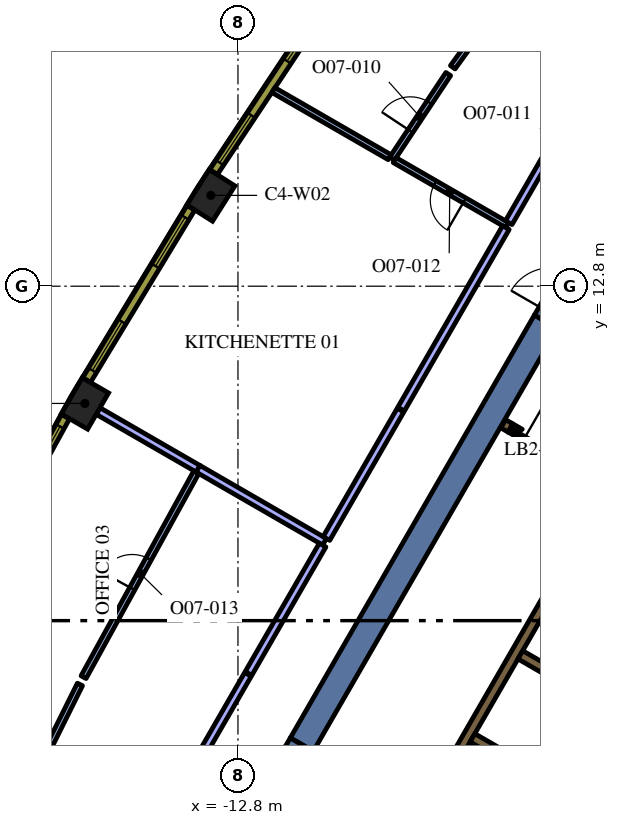
"""IFC4 building model, lengths in metres.
Left out: names, types, materials, properties, quantities, classifications, styles, units other than length and angle.
Written with IfcOpenShell. Run it as: python <this file> out.ifc"""

import sys

from ifc_helpers import new_model, si_unit, direction, frame, frame_2d, origin, origin_2d, place, context, subcontext, project, spatial, polyline, rectangle, outline, extrude, element, fill, save


model = new_model("IFC4")
c1 = context("Model", 3, precision=1e-05, world=origin(), true_north=direction((0.0, 1.0)))
c2 = subcontext(c1, "Body", "Model", "MODEL_VIEW")
j1 = project(units=[si_unit("LENGTHUNIT", "METRE"), si_unit("PLANEANGLEUNIT", "RADIAN")], contexts=[c1])
p1 = place(None, origin())
s1 = spatial("IfcSite", under=j1, at=p1, CompositionType="ELEMENT")
p2 = place(p1, origin())
s2 = spatial("IfcBuilding", under=s1, at=p2, CompositionType="ELEMENT")
p3 = place(p2, frame((0.0, 0.0, 214.2)))
s3 = spatial("IfcBuildingStorey", under=s2, at=p3, CompositionType="ELEMENT", Elevation=214.2)
for number, where, z_axis, x_axis in (
    (1, (-13.513, 15.19, 0.0), (0.0, 0.0, 1.0), (-0.536, -0.845, 0.0)),
    (2, (-16.827, 9.715, 0.0), (0.0, 0.0, 1.0), (-0.5, -0.866, 0.0)),
):
    element("IfcColumn", number, at=place(p3, frame(where, z_axis=z_axis, x_axis=x_axis)), inside=s3, PredefinedType="COLUMN", context=c2, shape_type="SweptSolid", body=[
        extrude(rectangle(XDim=1.1, YDim=0.8, at=origin_2d()), origin(), (0.0, 0.0, 1.0), 4.2),
    ])
p4 = place(p3, frame((-4.696, 11.867, 0.0), z_axis=(0.0, 0.0, 1.0), x_axis=(-0.500003726532, -0.866023252259, 0.0)))
e3 = element("IfcWall", 3, at=p4, inside=s3, PredefinedType="SOLIDWALL", context=c2, shape_type="SweptSolid", body=[
    extrude(rectangle(XDim=12.848, YDim=0.7, at=frame_2d((6.424, 0.0))), origin(), (0.0, 0.0, 1.0), 4.2),
])
p5 = place(p3, origin())
e4 = element("IfcWall", 4, at=p5, inside=s3, PredefinedType="SOLIDWALL", context=c2, shape_type="SweptSolid", body=[
    extrude(outline(polyline([(-11.543, 0.708), (-11.424, 0.914), (-10.843, 0.578), (-10.962, 0.372), (-11.543, 0.708)])), origin(), (0.0, 0.0, 1.0), 4.2),
])
p6 = place(p3, frame((-8.06, -1.311, 0.0), z_axis=(0.0, 0.0, 1.0), x_axis=(0.50000273126, 0.866023826885, 0.0)))
e5 = element("IfcWall", 5, at=p6, inside=s3, PredefinedType="SOLIDWALL", context=c2, shape_type="SweptSolid", body=[
    extrude(rectangle(XDim=10.33, YDim=0.25, at=frame_2d((5.165, 0.0))), origin(), (0.0, 0.0, 1.0), 4.2),
])
for number, where, z_axis, x_axis in (
    (6, (-5.369, 3.1, 0.0), (0.0, 0.0, 1.0), (0.866, -0.5, 0.0)),
    (7, (-4.724, -0.182, 0.0), (0.0, 0.0, 1.0), (-0.866, 0.5, 0.0)),
):
    element("IfcWall", number, at=place(p3, frame(where, z_axis=z_axis, x_axis=x_axis)), inside=s3, PredefinedType="SOLIDWALL", context=c2, shape_type="SweptSolid", body=[
        extrude(rectangle(XDim=2.2, YDim=0.25, at=frame_2d((1.1, 0.0))), origin(), (0.0, 0.0, 1.0), 4.2),
    ])
p7 = place(p3, frame((-5.629, 9.07, 0.0), z_axis=(0.0, 0.0, 1.0), x_axis=(-0.866185586049, 0.49972245349, 0.0)))
e8 = element("IfcWall", 8, at=p7, inside=s3, PredefinedType="SOLIDWALL", context=c2, shape_type="SweptSolid", body=[
    extrude(rectangle(XDim=0.22, YDim=0.25, at=frame_2d((0.11, 0.0))), origin(), (0.0, 0.0, 1.0), 4.2),
])
e9 = element("IfcWall", 9, at=p5, inside=s3, PredefinedType="SOLIDWALL", context=c2, shape_type="SweptSolid", body=[
    extrude(outline(polyline([(-5.689, 8.96), (-5.69, 8.961), (-5.565, 9.177), (-5.319, 9.035), (-5.335, 9.026), (-5.351, 9.015), (-5.366, 9.002), (-5.379, 8.988), (-5.392, 8.972), (-5.402, 8.956), (-5.412, 8.939), (-5.629, 9.064), (-5.629, 9.064), (-5.689, 8.96)])), origin(), (0.0, 0.0, 1.0), 4.2),
])
p8 = place(p3, frame((-0.898, 6.194, 0.0), z_axis=(0.0, 0.0, 1.0), x_axis=(-0.499996202215, -0.866027596426, 0.0)))
e10 = element("IfcWall", 10, at=p8, inside=s3, PredefinedType="SOLIDWALL", context=c2, shape_type="SweptSolid", body=[
    extrude(rectangle(XDim=9.83, YDim=0.25, at=frame_2d((4.915, 0.0))), origin(), (0.0, 0.0, 1.0), 4.2),
])
p9 = place(p8, frame((0.585, 0.0, 0.0)))
e11 = element("IfcOpeningElement", 11, at=p9, cuts=e10, PredefinedType="OPENING", context=c2, shape_type="SweptSolid", body=[
    extrude(rectangle(XDim=1.1, YDim=2.1, at=frame_2d((0.55, 1.05))), frame((0.0, 0.135, 0.0), z_axis=(0.0, -1.0, 0.0), x_axis=(1.0, 0.0, 0.0)), (0.0, 0.0, 1.0), 0.27),
])
p10 = place(p8, frame((3.105, 0.0, 0.0)))
e12 = element("IfcOpeningElement", 12, at=p10, cuts=e10, PredefinedType="OPENING", context=c2, shape_type="SweptSolid", body=[
    extrude(rectangle(XDim=1.1, YDim=2.1, at=frame_2d((0.55, 1.05))), frame((0.0, 0.135, 0.0), z_axis=(0.0, -1.0, 0.0), x_axis=(1.0, 0.0, 0.0)), (0.0, 0.0, 1.0), 0.27),
])
p11 = place(p8, frame((5.625, 0.0, 0.0)))
e13 = element("IfcOpeningElement", 13, at=p11, cuts=e10, PredefinedType="OPENING", context=c2, shape_type="SweptSolid", body=[
    extrude(rectangle(XDim=1.1, YDim=2.1, at=frame_2d((0.55, 1.05))), frame((0.0, 0.135, 0.0), z_axis=(0.0, -1.0, 0.0), x_axis=(1.0, 0.0, 0.0)), (0.0, 0.0, 1.0), 0.27),
])
p12 = place(p8, frame((8.145, 0.0, 0.0)))
e14 = element("IfcOpeningElement", 14, at=p12, cuts=e10, PredefinedType="OPENING", context=c2, shape_type="SweptSolid", body=[
    extrude(rectangle(XDim=1.1, YDim=2.1, at=frame_2d((0.55, 1.05))), frame((0.0, 0.135, 0.0), z_axis=(0.0, -1.0, 0.0), x_axis=(1.0, 0.0, 0.0)), (0.0, 0.0, 1.0), 0.27),
])
p13 = place(p3, frame((-5.659, 9.012, 0.0), z_axis=(0.0, 0.0, 1.0), x_axis=(0.866009402589, -0.500027713859, 0.0)))
e15 = element("IfcWall", 15, at=p13, inside=s3, PredefinedType="PARTITIONING", context=c2, shape_type="SweptSolid", body=[
    extrude(rectangle(XDim=2.1, YDim=0.12, at=frame_2d((1.05, 0.0))), origin(), (0.0, 0.0, 1.0), 3.45),
])
p14 = place(p13, frame((0.45, 0.0, 0.0)))
e16 = element("IfcOpeningElement", 16, at=p14, cuts=e15, PredefinedType="OPENING", context=c2, shape_type="SweptSolid", body=[
    extrude(rectangle(XDim=1.2, YDim=2.1, at=frame_2d((0.6, 1.05))), frame((0.0, 0.07, 0.0), z_axis=(0.0, -1.0, 0.0), x_axis=(1.0, 0.0, 0.0)), (0.0, 0.0, 1.0), 0.14),
])
p15 = place(p3, frame((-4.696, 11.867, 0.0), z_axis=(0.0, 0.0, 1.0), x_axis=(0.499892348375, 0.866087547558, 0.0)))
e17 = element("IfcWall", 17, at=p15, inside=s3, PredefinedType="SOLIDWALL", context=c2, shape_type="SweptSolid", body=[
    extrude(rectangle(XDim=1.7, YDim=0.7, at=frame_2d((0.85, 0.0))), origin(), (0.0, 0.0, 1.0), 4.2),
])
p16 = place(p15, frame((0.25, 0.0, 0.0)))
e18 = element("IfcOpeningElement", 18, at=p16, cuts=e17, PredefinedType="OPENING", context=c2, shape_type="SweptSolid", body=[
    extrude(rectangle(XDim=1.2, YDim=2.1, at=frame_2d((0.6, 1.05))), frame((0.0, 0.36, 0.0), z_axis=(0.0, -1.0, 0.0), x_axis=(1.0, 0.0, 0.0)), (0.0, 0.0, 1.0), 0.72),
])
p17 = place(p3, frame((-5.809, 20.407, 0.0), z_axis=(0.0, 0.0, 1.0), x_axis=(-0.587095604593, -0.809517603927, 0.0)))
e19 = element("IfcWall", 19, at=p17, inside=s3, PredefinedType="PARTITIONING", context=c2, shape_type="SweptSolid", body=[
    extrude(rectangle(XDim=2.281, YDim=0.15, at=frame_2d((1.141, 0.0))), origin(), (0.0, 0.0, 1.0), 3.45),
])
p18 = place(p3, frame((-8.744, 16.156, 0.0), z_axis=(0.0, 0.0, 1.0), x_axis=(0.552885218102, 0.833257424572, 0.0)))
e20 = element("IfcWall", 20, at=p18, inside=s3, PredefinedType="PARTITIONING", context=c2, shape_type="SweptSolid", body=[
    extrude(rectangle(XDim=2.672, YDim=0.15, at=frame_2d((1.336, 0.0))), origin(), (0.0, 0.0, 1.0), 3.45),
])
p19 = place(p18, frame((0.872, 0.0, 0.0)))
e21 = element("IfcOpeningElement", 21, at=p19, cuts=e20, PredefinedType="OPENING", context=c2, shape_type="SweptSolid", body=[
    extrude(rectangle(XDim=0.9, YDim=2.1, at=frame_2d((0.45, 1.05))), frame((0.0, 0.085, 0.0), z_axis=(0.0, -1.0, 0.0), x_axis=(1.0, 0.0, 0.0)), (0.0, 0.0, 1.0), 0.17),
])
p20 = place(p3, frame((-8.809, 16.194, 0.0), z_axis=(0.0, 0.0, 1.0), x_axis=(-0.865996792572, 0.500049552799, 0.0)))
e22 = element("IfcWall", 22, at=p20, inside=s3, PredefinedType="PARTITIONING", context=c2, shape_type="SweptSolid", body=[
    extrude(rectangle(XDim=3.532, YDim=0.15, at=frame_2d((1.766, 0.0))), origin(), (0.0, 0.0, 1.0), 3.45),
])
p21 = place(p3, frame((-5.712, 14.406, 0.0), z_axis=(0.0, 0.0, 1.0), x_axis=(-0.866050272892, 0.499956922968, 0.0)))
e23 = element("IfcWall", 23, at=p21, inside=s3, PredefinedType="PARTITIONING", context=c2, shape_type="SweptSolid", body=[
    extrude(rectangle(XDim=3.425, YDim=0.15, at=frame_2d((1.712, 0.0))), origin(), (0.0, 0.0, 1.0), 3.45),
])
p22 = place(p21, frame((1.3, 0.0, 0.0)))
e24 = element("IfcOpeningElement", 24, at=p22, cuts=e23, PredefinedType="OPENING", context=c2, shape_type="SweptSolid", body=[
    extrude(rectangle(XDim=0.9, YDim=2.1, at=frame_2d((0.45, 1.05))), frame((0.0, 0.085, 0.0), z_axis=(0.0, -1.0, 0.0), x_axis=(1.0, 0.0, 0.0)), (0.0, 0.0, 1.0), 0.17),
])
p23 = place(p3, frame((-3.364, 18.474, 0.0), z_axis=(0.0, 0.0, 1.0), x_axis=(-0.500007432598, -0.866021112529, 0.0)))
e25 = element("IfcWall", 25, at=p23, inside=s3, PredefinedType="PARTITIONING", context=c2, shape_type="SweptSolid", body=[
    extrude(rectangle(XDim=4.623, YDim=0.2, at=frame_2d((2.311, 0.0))), origin(), (0.0, 0.0, 1.0), 3.45),
])
p24 = place(p23, frame((1.8, 0.0, 0.0)))
e26 = element("IfcOpeningElement", 26, at=p24, cuts=e25, PredefinedType="OPENING", context=c2, shape_type="SweptSolid", body=[
    extrude(rectangle(XDim=1.0, YDim=2.1, at=frame_2d((0.5, 1.05))), frame((0.0, 0.11, 0.0), z_axis=(0.0, -1.0, 0.0), x_axis=(1.0, 0.0, 0.0)), (0.0, 0.0, 1.0), 0.22),
])
p25 = place(p3, frame((-13.844, 7.993, 0.0), z_axis=(0.0, 0.0, 1.0), x_axis=(-0.866003976688, 0.500037110984, 0.0)))
e27 = element("IfcWall", 27, at=p25, inside=s3, PredefinedType="PARTITIONING", context=c2, shape_type="SweptSolid", body=[
    extrude(rectangle(XDim=3.045, YDim=0.2, at=frame_2d((1.522, 0.0))), origin(), (0.0, 0.0, 1.0), 3.45),
])
p26 = place(p3, frame((-10.522, 6.075, 0.0), z_axis=(0.0, 0.0, 1.0), x_axis=(-0.866002601515, 0.500039492609, 0.0)))
e28 = element("IfcWall", 28, at=p26, inside=s3, PredefinedType="PARTITIONING", context=c2, shape_type="SweptSolid", body=[
    extrude(rectangle(XDim=3.844, YDim=0.2, at=frame_2d((1.922, 0.0))), origin(), (0.0, 0.0, 1.0), 3.45),
])
p27 = place(p3, frame((-8.522, 9.539, 0.0), z_axis=(0.0, 0.0, 1.0), x_axis=(-0.499997012787, -0.866027128446, 0.0)))
e29 = element("IfcWall", 29, at=p27, inside=s3, PredefinedType="PARTITIONING", context=c2, shape_type="SweptSolid", body=[
    extrude(rectangle(XDim=3.9, YDim=0.2, at=frame_2d((1.95, 0.0))), origin(), (0.0, 0.0, 1.0), 3.45),
])
p28 = place(p3, frame((-5.75, 14.341, 0.0), z_axis=(0.0, 0.0, 1.0), x_axis=(-0.499995817524, -0.866027818524, 0.0)))
e30 = element("IfcWall", 30, at=p28, inside=s3, PredefinedType="PARTITIONING", context=c2, shape_type="SweptSolid", body=[
    extrude(rectangle(XDim=5.515, YDim=0.2, at=frame_2d((2.757, 0.0))), origin(), (0.0, 0.0, 1.0), 3.45),
])
p29 = place(p3, frame((-16.863, 2.513, 0.0), z_axis=(0.0, 0.0, 1.0), x_axis=(0.48192483879, 0.876212559689, 0.0)))
e31 = element("IfcWall", 31, at=p29, inside=s3, PredefinedType="PARTITIONING", context=c2, shape_type="SweptSolid", body=[
    extrude(rectangle(XDim=6.157, YDim=0.15, at=frame_2d((3.078, 0.0))), origin(), (0.0, 0.0, 1.0), 3.45),
])
p30 = place(p29, frame((2.657, 0.0, 0.0)))
e32 = element("IfcOpeningElement", 32, at=p30, cuts=e31, PredefinedType="OPENING", context=c2, shape_type="SweptSolid", body=[
    extrude(rectangle(XDim=0.9, YDim=2.1, at=frame_2d((0.45, 1.05))), frame((0.0, 0.085, 0.0), z_axis=(0.0, -1.0, 0.0), x_axis=(1.0, 0.0, 0.0)), (0.0, 0.0, 1.0), 0.17),
])
p31 = place(p3, frame((-16.958, 2.321, 0.0), z_axis=(0.0, 0.0, 1.0), x_axis=(-0.445184199442, -0.895439014432, 0.0)))
e33 = element("IfcWall", 33, at=p31, inside=s3, PredefinedType="PARTITIONING", context=c2, shape_type="SweptSolid", body=[
    extrude(rectangle(XDim=3.082, YDim=0.15, at=frame_2d((1.541, 0.0))), origin(), (0.0, 0.0, 1.0), 3.45),
])
p32 = place(p3, frame((-10.572, 5.988, 0.0), z_axis=(0.0, 0.0, 1.0), x_axis=(-0.499997012787, -0.866027128446, 0.0)))
e34 = element("IfcWall", 34, at=p32, inside=s3, PredefinedType="PARTITIONING", context=c2, shape_type="SweptSolid", body=[
    extrude(rectangle(XDim=3.9, YDim=0.2, at=frame_2d((1.95, 0.0))), origin(), (0.0, 0.0, 1.0), 3.45),
])
p33 = place(p3, frame((-12.537, 2.585, 0.0), z_axis=(0.0, 0.0, 1.0), x_axis=(-0.500002393198, -0.866024022066, 0.0)))
e35 = element("IfcWall", 35, at=p33, inside=s3, PredefinedType="PARTITIONING", context=c2, shape_type="SweptSolid", body=[
    extrude(rectangle(XDim=10.317, YDim=0.2, at=frame_2d((5.159, 0.0))), origin(), (0.0, 0.0, 1.0), 3.45),
])
p34 = place(p33, frame((4.7, 0.0, 0.0)))
e36 = element("IfcOpeningElement", 36, at=p34, cuts=e35, PredefinedType="OPENING", context=c2, shape_type="SweptSolid", body=[
    extrude(rectangle(XDim=1.0, YDim=2.1, at=frame_2d((0.5, 1.05))), frame((0.0, 0.11, 0.0), z_axis=(0.0, -1.0, 0.0), x_axis=(1.0, 0.0, 0.0)), (0.0, 0.0, 1.0), 0.22),
])
p35 = place(p3, frame((-10.513, 20.218, 0.0), z_axis=(0.0, 0.0, 1.0), x_axis=(-0.552901821755, -0.833246407433, 0.0)))
e37 = element("IfcWall", 37, at=p35, inside=s3, PredefinedType="SOLIDWALL", context=c2, shape_type="SweptSolid", body=[
    extrude(rectangle(XDim=5.298, YDim=0.24, at=frame_2d((2.649, 0.0))), origin(), (0.0, 0.0, 1.0), 3.95),
])
p36 = place(p35, frame((0.294, 0.0, 0.9)))
e38 = element("IfcOpeningElement", 38, at=p36, cuts=e37, PredefinedType="OPENING", context=c2, shape_type="SweptSolid", body=[
    extrude(rectangle(XDim=1.5, YDim=2.55, at=frame_2d((0.75, 1.275))), frame((0.0, 0.13, 0.0), z_axis=(0.0, -1.0, 0.0), x_axis=(1.0, 0.0, 0.0)), (0.0, 0.0, 1.0), 0.26),
])
p37 = place(p35, frame((3.504, 0.0, 0.9)))
e39 = element("IfcOpeningElement", 39, at=p37, cuts=e37, PredefinedType="OPENING", context=c2, shape_type="SweptSolid", body=[
    extrude(rectangle(XDim=1.5, YDim=2.55, at=frame_2d((0.75, 1.275))), frame((0.0, 0.13, 0.0), z_axis=(0.0, -1.0, 0.0), x_axis=(1.0, 0.0, 0.0)), (0.0, 0.0, 1.0), 0.26),
])
p38 = place(p3, frame((-14.038, 14.864, 0.0), z_axis=(0.0, 0.0, 1.0), x_axis=(-0.517846166225, -0.855473756538, 0.0)))
e40 = element("IfcWall", 40, at=p38, inside=s3, PredefinedType="SOLIDWALL", context=c2, shape_type="SweptSolid", body=[
    extrude(rectangle(XDim=5.298, YDim=0.24, at=frame_2d((2.649, 0.0))), origin(), (0.0, 0.0, 1.0), 3.95),
])
p39 = place(p38, frame((0.294, 0.0, 0.9)))
e41 = element("IfcOpeningElement", 41, at=p39, cuts=e40, PredefinedType="OPENING", context=c2, shape_type="SweptSolid", body=[
    extrude(rectangle(XDim=1.5, YDim=2.55, at=frame_2d((0.75, 1.275))), frame((0.0, 0.13, 0.0), z_axis=(0.0, -1.0, 0.0), x_axis=(1.0, 0.0, 0.0)), (0.0, 0.0, 1.0), 0.26),
])
p40 = place(p38, frame((3.504, 0.0, 0.9)))
e42 = element("IfcOpeningElement", 42, at=p40, cuts=e40, PredefinedType="OPENING", context=c2, shape_type="SweptSolid", body=[
    extrude(rectangle(XDim=1.5, YDim=2.55, at=frame_2d((0.75, 1.275))), frame((0.0, 0.13, 0.0), z_axis=(0.0, -1.0, 0.0), x_axis=(1.0, 0.0, 0.0)), (0.0, 0.0, 1.0), 0.26),
])
p41 = place(p3, frame((-17.338, 9.368, 0.0), z_axis=(0.0, 0.0, 1.0), x_axis=(-0.481925825015, -0.876212017256, 0.0)))
e43 = element("IfcWall", 43, at=p41, inside=s3, PredefinedType="SOLIDWALL", context=c2, shape_type="SweptSolid", body=[
    extrude(rectangle(XDim=5.299, YDim=0.24, at=frame_2d((2.649, 0.0))), origin(), (0.0, 0.0, 1.0), 3.95),
])
p42 = place(p41, frame((0.295, 0.0, 0.9)))
e44 = element("IfcOpeningElement", 44, at=p42, cuts=e43, PredefinedType="OPENING", context=c2, shape_type="SweptSolid", body=[
    extrude(rectangle(XDim=1.5, YDim=2.55, at=frame_2d((0.75, 1.275))), frame((0.0, 0.13, 0.0), z_axis=(0.0, -1.0, 0.0), x_axis=(1.0, 0.0, 0.0)), (0.0, 0.0, 1.0), 0.26),
])
p43 = place(p41, frame((3.504, 0.0, 0.9)))
e45 = element("IfcOpeningElement", 45, at=p43, cuts=e43, PredefinedType="OPENING", context=c2, shape_type="SweptSolid", body=[
    extrude(rectangle(XDim=1.5, YDim=2.55, at=frame_2d((0.75, 1.275))), frame((0.0, 0.13, 0.0), z_axis=(0.0, -1.0, 0.0), x_axis=(1.0, 0.0, 0.0)), (0.0, 0.0, 1.0), 0.26),
])
p44 = place(p14, origin())
e46 = element("IfcDoor", 46, at=p44, inside=s3, OperationType="SINGLE_SWING_LEFT", PredefinedType="DOOR", context=c2, shape_type="SweptSolid", body=[
    extrude(rectangle(XDim=1.2, YDim=2.1, at=frame_2d((0.6, 1.05))), frame((0.0, 0.025, 0.0), z_axis=(0.0, -1.0, 0.0), x_axis=(1.0, 0.0, 0.0)), (0.0, 0.0, 1.0), 0.05),
])
fill(e16, e46)
p45 = place(p19, origin())
e47 = element("IfcDoor", 47, at=p45, inside=s3, OperationType="SINGLE_SWING_LEFT", PredefinedType="DOOR", context=c2, shape_type="SweptSolid", body=[
    extrude(rectangle(XDim=0.9, YDim=2.1, at=frame_2d((0.45, 1.05))), frame((0.0, 0.025, 0.0), z_axis=(0.0, -1.0, 0.0), x_axis=(1.0, 0.0, 0.0)), (0.0, 0.0, 1.0), 0.05),
])
fill(e21, e47)
p46 = place(p22, origin())
e48 = element("IfcDoor", 48, at=p46, inside=s3, OperationType="SINGLE_SWING_RIGHT", PredefinedType="DOOR", context=c2, shape_type="SweptSolid", body=[
    extrude(rectangle(XDim=0.9, YDim=2.1, at=frame_2d((0.45, 1.05))), frame((0.0, 0.025, 0.0), z_axis=(0.0, -1.0, 0.0), x_axis=(1.0, 0.0, 0.0)), (0.0, 0.0, 1.0), 0.05),
])
fill(e24, e48)
p47 = place(p30, origin())
e49 = element("IfcDoor", 49, at=p47, inside=s3, OperationType="SINGLE_SWING_RIGHT", PredefinedType="DOOR", context=c2, shape_type="SweptSolid", body=[
    extrude(rectangle(XDim=0.9, YDim=2.1, at=frame_2d((0.45, 1.05))), frame((0.0, 0.025, 0.0), z_axis=(0.0, -1.0, 0.0), x_axis=(1.0, 0.0, 0.0)), (0.0, 0.0, 1.0), 0.05),
])
fill(e32, e49)
p48 = place(p36, origin())
e50 = element("IfcWindow", 50, at=p48, inside=s3, PartitioningType="SINGLE_PANEL", PredefinedType="WINDOW", context=c2, shape_type="SweptSolid", body=[
    extrude(rectangle(XDim=1.5, YDim=2.55, at=frame_2d((0.75, 1.275))), frame((0.0, 0.04, 0.0), z_axis=(0.0, -1.0, 0.0), x_axis=(1.0, 0.0, 0.0)), (0.0, 0.0, 1.0), 0.06),
])
fill(e38, e50)
p49 = place(p37, origin())
e51 = element("IfcWindow", 51, at=p49, inside=s3, PartitioningType="SINGLE_PANEL", PredefinedType="WINDOW", context=c2, shape_type="SweptSolid", body=[
    extrude(rectangle(XDim=1.5, YDim=2.55, at=frame_2d((0.75, 1.275))), frame((0.0, 0.04, 0.0), z_axis=(0.0, -1.0, 0.0), x_axis=(1.0, 0.0, 0.0)), (0.0, 0.0, 1.0), 0.06),
])
fill(e39, e51)
p50 = place(p39, origin())
e52 = element("IfcWindow", 52, at=p50, inside=s3, PartitioningType="SINGLE_PANEL", PredefinedType="WINDOW", context=c2, shape_type="SweptSolid", body=[
    extrude(rectangle(XDim=1.5, YDim=2.55, at=frame_2d((0.75, 1.275))), frame((0.0, 0.04, 0.0), z_axis=(0.0, -1.0, 0.0), x_axis=(1.0, 0.0, 0.0)), (0.0, 0.0, 1.0), 0.06),
])
fill(e41, e52)
p51 = place(p40, origin())
e53 = element("IfcWindow", 53, at=p51, inside=s3, PartitioningType="SINGLE_PANEL", PredefinedType="WINDOW", context=c2, shape_type="SweptSolid", body=[
    extrude(rectangle(XDim=1.5, YDim=2.55, at=frame_2d((0.75, 1.275))), frame((0.0, 0.04, 0.0), z_axis=(0.0, -1.0, 0.0), x_axis=(1.0, 0.0, 0.0)), (0.0, 0.0, 1.0), 0.06),
])
fill(e42, e53)
p52 = place(p42, origin())
e54 = element("IfcWindow", 54, at=p52, inside=s3, PartitioningType="SINGLE_PANEL", PredefinedType="WINDOW", context=c2, shape_type="SweptSolid", body=[
    extrude(rectangle(XDim=1.5, YDim=2.55, at=frame_2d((0.75, 1.275))), frame((0.0, 0.04, 0.0), z_axis=(0.0, -1.0, 0.0), x_axis=(1.0, 0.0, 0.0)), (0.0, 0.0, 1.0), 0.06),
])
fill(e44, e54)
save(model, sys.argv[1])
